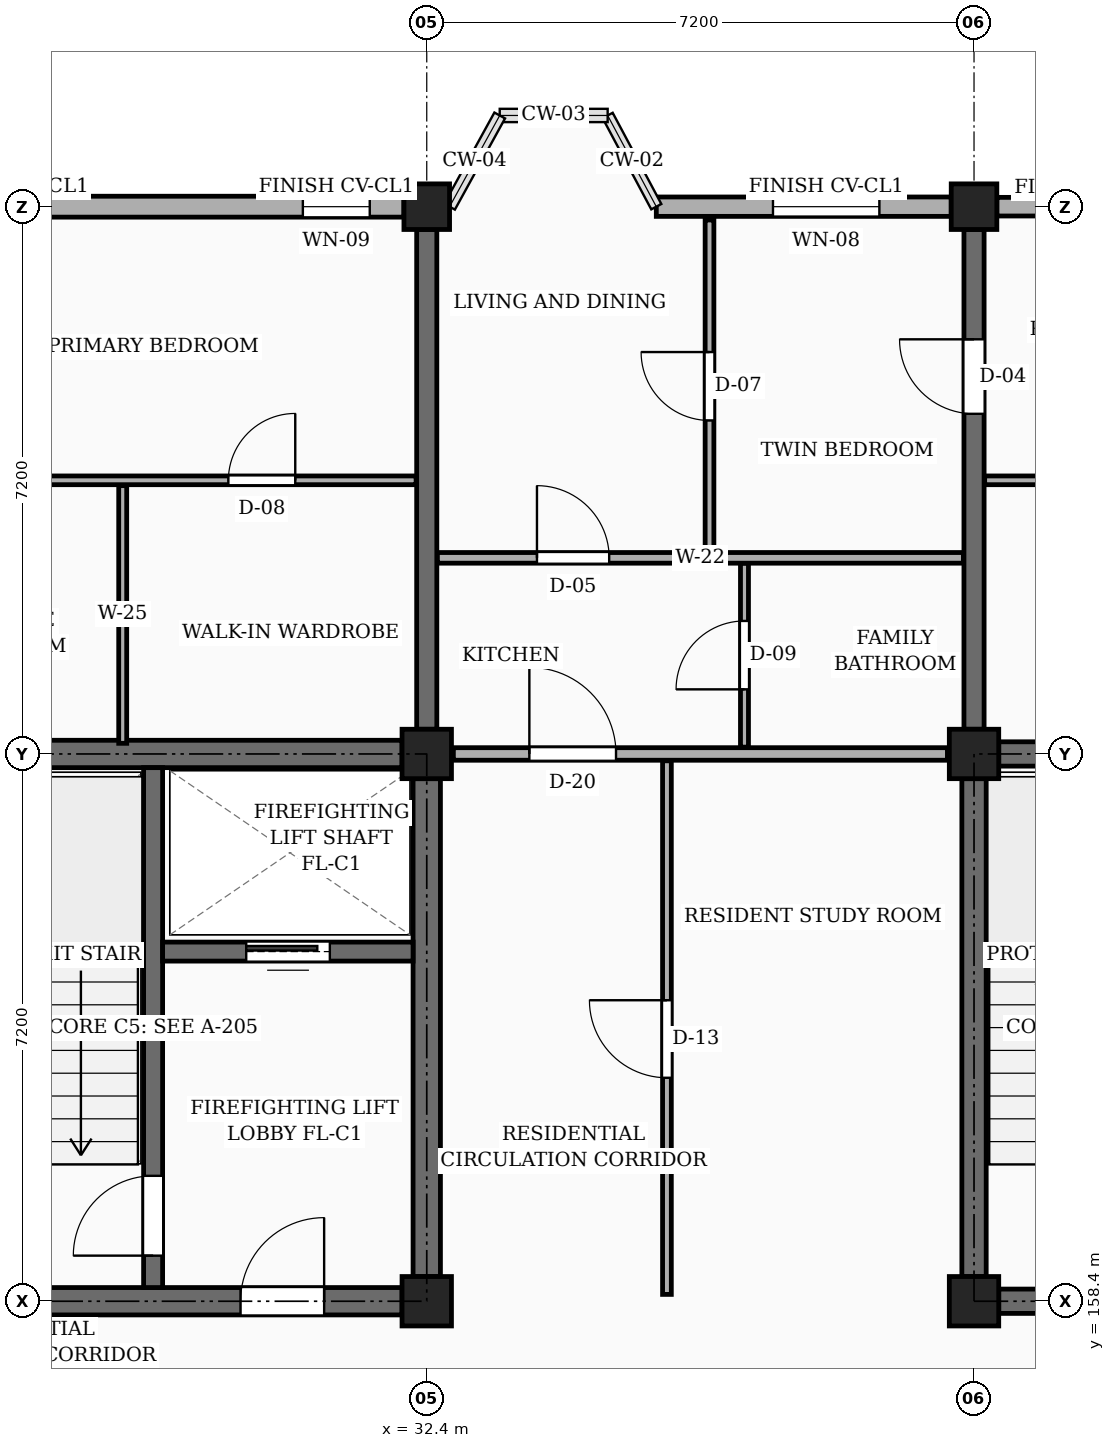
"""IFC4 building model, lengths in metres.
Left out: names, types, materials, properties, quantities, classifications, styles, units other than length and angle.
Written with IfcOpenShell. Run it as: python <this file> out.ifc"""

import sys

from ifc_helpers import new_model, si_unit, direction, frame, frame_2d, origin, origin_2d, place, context, subcontext, project, spatial, rectangle, extrude, element, fill, save


model = new_model("IFC4")
c1 = context("Model", 3, precision=1e-05, world=origin(), true_north=direction((0.0, 1.0)))
c2 = subcontext(c1, "Body", "Model", "MODEL_VIEW")
j1 = project(units=[si_unit("LENGTHUNIT", "METRE"), si_unit("PLANEANGLEUNIT", "RADIAN")], contexts=[c1])
p1 = place(None, origin())
s1 = spatial("IfcSite", under=j1, at=p1, CompositionType="ELEMENT")
p2 = place(p1, origin())
s2 = spatial("IfcBuilding", under=s1, at=p2, CompositionType="ELEMENT")
p3 = place(p2, frame((0.0, 0.0, 7.65)))
s3 = spatial("IfcBuildingStorey", under=s2, at=p3, CompositionType="ELEMENT", Elevation=7.65)
for number, where, z_axis, x_axis in (
    (1, (32.4, 158.4, 0.0), (0.0, 0.0, 1.0), (1.0, 0.0, 0.0)),
    (2, (32.4, 165.6, 0.0), (0.0, 0.0, 1.0), (1.0, 0.0, 0.0)),
):
    element("IfcColumn", number, at=place(p3, frame(where, z_axis=z_axis, x_axis=x_axis)), inside=s3, PredefinedType="COLUMN", context=c2, shape_type="SweptSolid", body=[
        extrude(rectangle(XDim=0.65, YDim=0.65, at=origin_2d()), origin(), (0.0, 0.0, 1.0), 3.15),
    ])
p4 = place(p3, frame((32.4, 172.8, 0.0), z_axis=(0.0, 0.0, 1.0), x_axis=(1.0, 0.0, 0.0)))
e3 = element("IfcColumn", 3, at=p4, inside=s3, PredefinedType="COLUMN", context=c2, shape_type="SweptSolid", body=[
    extrude(rectangle(XDim=0.6, YDim=0.6, at=origin_2d()), origin(), (0.0, 0.0, 1.0), 3.15),
])
for number, where, z_axis, x_axis in (
    (4, (39.6, 158.4, 0.0), (0.0, 0.0, 1.0), (1.0, 0.0, 0.0)),
    (5, (39.6, 165.6, 0.0), (0.0, 0.0, 1.0), (1.0, 0.0, 0.0)),
):
    element("IfcColumn", number, at=place(p3, frame(where, z_axis=z_axis, x_axis=x_axis)), inside=s3, PredefinedType="COLUMN", context=c2, shape_type="SweptSolid", body=[
        extrude(rectangle(XDim=0.65, YDim=0.65, at=origin_2d()), origin(), (0.0, 0.0, 1.0), 3.15),
    ])
p5 = place(p3, frame((39.6, 172.8, 0.0), z_axis=(0.0, 0.0, 1.0), x_axis=(1.0, 0.0, 0.0)))
e6 = element("IfcColumn", 6, at=p5, inside=s3, PredefinedType="COLUMN", context=c2, shape_type="SweptSolid", body=[
    extrude(rectangle(XDim=0.6, YDim=0.6, at=origin_2d()), origin(), (0.0, 0.0, 1.0), 3.15),
])
p6 = place(p3, frame((32.4, 165.925, 0.0), z_axis=(0.0, 0.0, 1.0), x_axis=(0.0, 1.0, 0.0)))
e7 = element("IfcWall", 7, at=p6, inside=s3, PredefinedType="SOLIDWALL", context=c2, shape_type="SweptSolid", body=[
    extrude(rectangle(XDim=6.575, YDim=0.265, at=frame_2d((3.288, 0.0))), origin(), (0.0, 0.0, 1.0), 2.185),
])
p7 = place(p3, frame((39.6, 165.925, 0.0), z_axis=(0.0, 0.0, 1.0), x_axis=(0.0, 1.0, 0.0)))
e8 = element("IfcWall", 8, at=p7, inside=s3, PredefinedType="SOLIDWALL", context=c2, shape_type="SweptSolid", body=[
    extrude(rectangle(XDim=6.575, YDim=0.265, at=frame_2d((3.288, 0.0))), origin(), (0.0, 0.0, 1.0), 2.185),
])
p8 = place(p7, frame((4.15, 0.0, 0.0)))
e9 = element("IfcOpeningElement", 9, at=p8, cuts=e8, PredefinedType="OPENING", context=c2, shape_type="SweptSolid", body=[
    extrude(rectangle(XDim=0.98, YDim=2.12, at=frame_2d((0.49, 1.06))), frame((0.0, 0.143, 0.0), z_axis=(0.0, -1.0, 0.0), x_axis=(1.0, 0.0, 0.0)), (0.0, 0.0, 1.0), 0.285),
])
p9 = place(p3, frame((46.5, 172.8, 0.0), z_axis=(0.0, 0.0, 1.0), x_axis=(-1.0, 0.0, 0.0)))
e10 = element("IfcWall", 10, at=p9, inside=s3, PredefinedType="SOLIDWALL", context=c2, shape_type="SweptSolid", body=[
    extrude(rectangle(XDim=6.6, YDim=0.245, at=frame_2d((3.3, 0.0))), origin(), (0.0, 0.0, 1.0), 2.455),
])
p10 = place(p9, frame((0.45, 0.0, 0.78)))
e11 = element("IfcOpeningElement", 11, at=p10, cuts=e10, PredefinedType="OPENING", context=c2, shape_type="SweptSolid", body=[
    extrude(rectangle(XDim=1.24, YDim=1.15, at=frame_2d((0.62, 0.575))), frame((0.0, 0.133, 0.0), z_axis=(0.0, -1.0, 0.0), x_axis=(1.0, 0.0, 0.0)), (0.0, 0.0, 1.0), 0.265),
])
p11 = place(p9, frame((4.65, 0.0, 0.78)))
e12 = element("IfcOpeningElement", 12, at=p11, cuts=e10, PredefinedType="OPENING", context=c2, shape_type="SweptSolid", body=[
    extrude(rectangle(XDim=1.4, YDim=1.15, at=frame_2d((0.7, 0.575))), frame((0.0, 0.133, 0.0), z_axis=(0.0, -1.0, 0.0), x_axis=(1.0, 0.0, 0.0)), (0.0, 0.0, 1.0), 0.265),
])
p12 = place(p3, frame((39.3, 172.8, 0.0), z_axis=(0.0, 0.0, 1.0), x_axis=(-1.0, 0.0, 0.0)))
e13 = element("IfcWall", 13, at=p12, inside=s3, PredefinedType="SOLIDWALL", context=c2, shape_type="SweptSolid", body=[
    extrude(rectangle(XDim=3.88, YDim=0.255, at=frame_2d((1.94, 0.0))), origin(), (0.0, 0.0, 1.0), 2.455),
])
p13 = place(p12, frame((0.945, 0.0, 0.78)))
e14 = element("IfcOpeningElement", 14, at=p13, cuts=e13, PredefinedType="OPENING", context=c2, shape_type="SweptSolid", body=[
    extrude(rectangle(XDim=1.4, YDim=1.15, at=frame_2d((0.7, 0.575))), frame((0.0, 0.137, 0.0), z_axis=(0.0, -1.0, 0.0), x_axis=(1.0, 0.0, 0.0)), (0.0, 0.0, 1.0), 0.275),
])
p14 = place(p3, frame((32.1, 172.8, 0.0), z_axis=(0.0, 0.0, 1.0), x_axis=(-1.0, 0.0, 0.0)))
e15 = element("IfcWall", 15, at=p14, inside=s3, PredefinedType="SOLIDWALL", context=c2, shape_type="SweptSolid", body=[
    extrude(rectangle(XDim=6.6, YDim=0.275, at=frame_2d((3.3, 0.0))), origin(), (0.0, 0.0, 1.0), 2.455),
])
p15 = place(p14, frame((0.45, 0.0, 0.78)))
e16 = element("IfcOpeningElement", 16, at=p15, cuts=e15, PredefinedType="OPENING", context=c2, shape_type="SweptSolid", body=[
    extrude(rectangle(XDim=0.88, YDim=1.26, at=frame_2d((0.44, 0.63))), frame((0.0, 0.147, 0.0), z_axis=(0.0, -1.0, 0.0), x_axis=(1.0, 0.0, 0.0)), (0.0, 0.0, 1.0), 0.295),
])
p16 = place(p14, frame((4.65, 0.0, 0.78)))
e17 = element("IfcOpeningElement", 17, at=p16, cuts=e15, PredefinedType="OPENING", context=c2, shape_type="SweptSolid", body=[
    extrude(rectangle(XDim=1.04, YDim=1.26, at=frame_2d((0.52, 0.63))), frame((0.0, 0.147, 0.0), z_axis=(0.0, -1.0, 0.0), x_axis=(1.0, 0.0, 0.0)), (0.0, 0.0, 1.0), 0.295),
])
p17 = place(p3, frame((25.525, 165.6, 0.0), z_axis=(0.0, 0.0, 1.0), x_axis=(1.0, 0.0, 0.0)))
e18 = element("IfcWall", 18, at=p17, inside=s3, PredefinedType="SHEAR", context=c2, shape_type="SweptSolid", body=[
    extrude(rectangle(XDim=6.55, YDim=0.36, at=frame_2d((3.275, 0.0))), origin(), (0.0, 0.0, 1.0), 2.885),
])
p18 = place(p3, frame((32.4, 158.725, 0.0), z_axis=(0.0, 0.0, 1.0), x_axis=(0.0, 1.0, 0.0)))
e19 = element("IfcWall", 19, at=p18, inside=s3, PredefinedType="SHEAR", context=c2, shape_type="SweptSolid", body=[
    extrude(rectangle(XDim=6.55, YDim=0.36, at=frame_2d((3.275, 0.0))), origin(), (0.0, 0.0, 1.0), 2.885),
])
p19 = place(p3, frame((25.525, 158.4, 0.0), z_axis=(0.0, 0.0, 1.0), x_axis=(1.0, 0.0, 0.0)))
e20 = element("IfcWall", 20, at=p19, inside=s3, PredefinedType="SHEAR", context=c2, shape_type="SweptSolid", body=[
    extrude(rectangle(XDim=6.55, YDim=0.36, at=frame_2d((3.275, 0.0))), origin(), (0.0, 0.0, 1.0), 2.885),
])
p20 = place(p19, frame((4.425, 0.0, 0.0)))
e21 = element("IfcOpeningElement", 21, at=p20, cuts=e20, PredefinedType="OPENING", context=c2, shape_type="SweptSolid", body=[
    extrude(rectangle(XDim=1.1, YDim=2.15, at=frame_2d((0.55, 1.075))), frame((0.0, 0.19, 0.0), z_axis=(0.0, -1.0, 0.0), x_axis=(1.0, 0.0, 0.0)), (0.0, 0.0, 1.0), 0.38),
])
p21 = place(p3, frame((28.8, 158.58, 0.0), z_axis=(0.0, 0.0, 1.0), x_axis=(0.0, 1.0, 0.0)))
e22 = element("IfcWall", 22, at=p21, inside=s3, PredefinedType="SHEAR", context=c2, shape_type="SweptSolid", body=[
    extrude(rectangle(XDim=6.84, YDim=0.25, at=frame_2d((3.42, 0.0))), origin(), (0.0, 0.0, 1.0), 2.885),
])
p22 = place(p21, frame((0.42, 0.0, 0.0)))
e23 = element("IfcOpeningElement", 23, at=p22, cuts=e22, PredefinedType="OPENING", context=c2, shape_type="SweptSolid", body=[
    extrude(rectangle(XDim=1.05, YDim=2.15, at=frame_2d((0.525, 1.075))), frame((0.0, 0.135, 0.0), z_axis=(0.0, -1.0, 0.0), x_axis=(1.0, 0.0, 0.0)), (0.0, 0.0, 1.0), 0.27),
])
p23 = place(p3, frame((28.925, 163.0, 0.0), z_axis=(0.0, 0.0, 1.0), x_axis=(1.0, 0.0, 0.0)))
e24 = element("IfcWall", 24, at=p23, inside=s3, PredefinedType="SHEAR", context=c2, shape_type="SweptSolid", body=[
    extrude(rectangle(XDim=3.295, YDim=0.25, at=frame_2d((1.647, 0.0))), origin(), (0.0, 0.0, 1.0), 2.885),
])
p24 = place(p23, frame((1.1, 0.0, 0.0)))
e25 = element("IfcOpeningElement", 25, at=p24, cuts=e24, PredefinedType="OPENING", context=c2, shape_type="SweptSolid", body=[
    extrude(rectangle(XDim=1.1, YDim=2.2, at=frame_2d((0.55, 1.1))), frame((0.0, 0.135, 0.0), z_axis=(0.0, -1.0, 0.0), x_axis=(1.0, 0.0, 0.0)), (0.0, 0.0, 1.0), 0.27),
])
p25 = place(p3, frame((39.6, 158.725, 0.0), z_axis=(0.0, 0.0, 1.0), x_axis=(0.0, 1.0, 0.0)))
e26 = element("IfcWall", 26, at=p25, inside=s3, PredefinedType="SHEAR", context=c2, shape_type="SweptSolid", body=[
    extrude(rectangle(XDim=6.55, YDim=0.32, at=frame_2d((3.275, 0.0))), origin(), (0.0, 0.0, 1.0), 2.885),
])
p26 = place(p3, frame((39.925, 165.6, 0.0), z_axis=(0.0, 0.0, 1.0), x_axis=(1.0, 0.0, 0.0)))
e27 = element("IfcWall", 27, at=p26, inside=s3, PredefinedType="SHEAR", context=c2, shape_type="SweptSolid", body=[
    extrude(rectangle(XDim=6.55, YDim=0.32, at=frame_2d((3.275, 0.0))), origin(), (0.0, 0.0, 1.0), 2.885),
])
p27 = place(p3, frame((39.925, 158.4, 0.0), z_axis=(0.0, 0.0, 1.0), x_axis=(1.0, 0.0, 0.0)))
e28 = element("IfcWall", 28, at=p27, inside=s3, PredefinedType="SHEAR", context=c2, shape_type="SweptSolid", body=[
    extrude(rectangle(XDim=6.55, YDim=0.32, at=frame_2d((3.275, 0.0))), origin(), (0.0, 0.0, 1.0), 2.885),
])
p28 = place(p27, frame((4.425, 0.0, 0.0)))
e29 = element("IfcOpeningElement", 29, at=p28, cuts=e28, PredefinedType="OPENING", context=c2, shape_type="SweptSolid", body=[
    extrude(rectangle(XDim=1.1, YDim=2.15, at=frame_2d((0.55, 1.075))), frame((0.0, 0.17, 0.0), z_axis=(0.0, -1.0, 0.0), x_axis=(1.0, 0.0, 0.0)), (0.0, 0.0, 1.0), 0.34),
])
p29 = place(p3, frame((32.75, 165.6, 0.0), z_axis=(0.0, 0.0, 1.0), x_axis=(1.0, 0.0, 0.0)))
e30 = element("IfcWall", 30, at=p29, inside=s3, PredefinedType="PARTITIONING", context=c2, shape_type="SweptSolid", body=[
    extrude(rectangle(XDim=6.5, YDim=0.165, at=frame_2d((3.25, 0.0))), origin(), (0.0, 0.0, 1.0), 2.185),
])
p30 = place(p29, frame((1.0, 0.0, 0.0)))
e31 = element("IfcOpeningElement", 31, at=p30, cuts=e30, PredefinedType="OPENING", context=c2, shape_type="SweptSolid", body=[
    extrude(rectangle(XDim=1.14, YDim=2.18, at=frame_2d((0.57, 1.09))), frame((0.0, 0.093, 0.0), z_axis=(0.0, -1.0, 0.0), x_axis=(1.0, 0.0, 0.0)), (0.0, 0.0, 1.0), 0.185),
])
p31 = place(p3, frame((25.34, 169.2, 0.0), z_axis=(0.0, 0.0, 1.0), x_axis=(1.0, 0.0, 0.0)))
e32 = element("IfcWall", 32, at=p31, inside=s3, PredefinedType="PARTITIONING", context=c2, shape_type="SweptSolid", body=[
    extrude(rectangle(XDim=6.92, YDim=0.115, at=frame_2d((3.46, 0.0))), origin(), (0.0, 0.0, 1.0), 2.32),
])
p32 = place(p31, frame((1.05, 0.0, 0.0)))
e33 = element("IfcOpeningElement", 33, at=p32, cuts=e32, PredefinedType="OPENING", context=c2, shape_type="SweptSolid", body=[
    extrude(rectangle(XDim=0.87, YDim=2.05, at=frame_2d((0.435, 1.025))), frame((0.0, 0.067, 0.0), z_axis=(0.0, -1.0, 0.0), x_axis=(1.0, 0.0, 0.0)), (0.0, 0.0, 1.0), 0.135),
])
p33 = place(p31, frame((4.45, 0.0, 0.0)))
e34 = element("IfcOpeningElement", 34, at=p33, cuts=e32, PredefinedType="OPENING", context=c2, shape_type="SweptSolid", body=[
    extrude(rectangle(XDim=0.88, YDim=2.08, at=frame_2d((0.44, 1.04))), frame((0.0, 0.067, 0.0), z_axis=(0.0, -1.0, 0.0), x_axis=(1.0, 0.0, 0.0)), (0.0, 0.0, 1.0), 0.135),
])
p34 = place(p3, frame((28.4, 165.74, 0.0), z_axis=(0.0, 0.0, 1.0), x_axis=(0.0, 1.0, 0.0)))
e35 = element("IfcWall", 35, at=p34, inside=s3, PredefinedType="PARTITIONING", context=c2, shape_type="SweptSolid", body=[
    extrude(rectangle(XDim=3.39, YDim=0.105, at=frame_2d((1.695, 0.0))), origin(), (0.0, 0.0, 1.0), 2.32),
])
p35 = place(p3, frame((35.56, 158.49, 0.0), z_axis=(0.0, 0.0, 1.0), x_axis=(0.0, 1.0, 0.0)))
e36 = element("IfcWall", 36, at=p35, inside=s3, PredefinedType="PARTITIONING", context=c2, shape_type="SweptSolid", body=[
    extrude(rectangle(XDim=7.02, YDim=0.115, at=frame_2d((3.51, 0.0))), origin(), (0.0, 0.0, 1.0), 2.32),
])
p36 = place(p35, frame((2.85, 0.0, 0.0)))
e37 = element("IfcOpeningElement", 37, at=p36, cuts=e36, PredefinedType="OPENING", context=c2, shape_type="SweptSolid", body=[
    extrude(rectangle(XDim=1.02, YDim=2.15, at=frame_2d((0.51, 1.075))), frame((0.0, 0.067, 0.0), z_axis=(0.0, -1.0, 0.0), x_axis=(1.0, 0.0, 0.0)), (0.0, 0.0, 1.0), 0.135),
])
p37 = place(p3, frame((36.12, 168.25, 0.0), z_axis=(0.0, 0.0, 1.0), x_axis=(0.0, 1.0, 0.0)))
e38 = element("IfcWall", 38, at=p37, inside=s3, PredefinedType="PARTITIONING", context=c2, shape_type="SweptSolid", body=[
    extrude(rectangle(XDim=4.375, YDim=0.115, at=frame_2d((2.188, 0.0))), origin(), (0.0, 0.0, 1.0), 2.32),
])
p38 = place(p37, frame((1.738, 0.0, 0.0)))
e39 = element("IfcOpeningElement", 39, at=p38, cuts=e38, PredefinedType="OPENING", context=c2, shape_type="SweptSolid", body=[
    extrude(rectangle(XDim=0.9, YDim=2.1, at=frame_2d((0.45, 1.05))), frame((0.0, 0.067, 0.0), z_axis=(0.0, -1.0, 0.0), x_axis=(1.0, 0.0, 0.0)), (0.0, 0.0, 1.0), 0.135),
])
p39 = place(p3, frame((36.58, 165.69, 0.0), z_axis=(0.0, 0.0, 1.0), x_axis=(0.0, 1.0, 0.0)))
e40 = element("IfcWall", 40, at=p39, inside=s3, PredefinedType="PARTITIONING", context=c2, shape_type="SweptSolid", body=[
    extrude(rectangle(XDim=2.42, YDim=0.105, at=frame_2d((1.21, 0.0))), origin(), (0.0, 0.0, 1.0), 2.32),
])
p40 = place(p39, frame((0.76, 0.0, 0.0)))
e41 = element("IfcOpeningElement", 41, at=p40, cuts=e40, PredefinedType="OPENING", context=c2, shape_type="SweptSolid", body=[
    extrude(rectangle(XDim=0.9, YDim=2.05, at=frame_2d((0.45, 1.025))), frame((0.0, 0.062, 0.0), z_axis=(0.0, -1.0, 0.0), x_axis=(1.0, 0.0, 0.0)), (0.0, 0.0, 1.0), 0.125),
])
p41 = place(p3, frame((32.54, 168.18, 0.0), z_axis=(0.0, 0.0, 1.0), x_axis=(1.0, 0.0, 0.0)))
e42 = element("IfcWall", 42, at=p41, inside=s3, PredefinedType="PARTITIONING", context=c2, shape_type="SweptSolid", body=[
    extrude(rectangle(XDim=6.92, YDim=0.14, at=frame_2d((3.46, 0.0))), origin(), (0.0, 0.0, 1.0), 2.32),
])
p42 = place(p41, frame((1.31, 0.0, 0.0)))
e43 = element("IfcOpeningElement", 43, at=p42, cuts=e42, PredefinedType="OPENING", context=c2, shape_type="SweptSolid", body=[
    extrude(rectangle(XDim=0.95, YDim=2.1, at=frame_2d((0.475, 1.05))), frame((0.0, 0.08, 0.0), z_axis=(0.0, -1.0, 0.0), x_axis=(1.0, 0.0, 0.0)), (0.0, 0.0, 1.0), 0.16),
])
p43 = place(p3, frame((39.74, 169.2, 0.0), z_axis=(0.0, 0.0, 1.0), x_axis=(1.0, 0.0, 0.0)))
e44 = element("IfcWall", 44, at=p43, inside=s3, PredefinedType="PARTITIONING", context=c2, shape_type="SweptSolid", body=[
    extrude(rectangle(XDim=6.92, YDim=0.115, at=frame_2d((3.46, 0.0))), origin(), (0.0, 0.0, 1.0), 2.32),
])
p44 = place(p43, frame((1.05, 0.0, 0.0)))
e45 = element("IfcOpeningElement", 45, at=p44, cuts=e44, PredefinedType="OPENING", context=c2, shape_type="SweptSolid", body=[
    extrude(rectangle(XDim=0.87, YDim=2.05, at=frame_2d((0.435, 1.025))), frame((0.0, 0.067, 0.0), z_axis=(0.0, -1.0, 0.0), x_axis=(1.0, 0.0, 0.0)), (0.0, 0.0, 1.0), 0.135),
])
p45 = place(p43, frame((4.45, 0.0, 0.0)))
e46 = element("IfcOpeningElement", 46, at=p45, cuts=e44, PredefinedType="OPENING", context=c2, shape_type="SweptSolid", body=[
    extrude(rectangle(XDim=0.88, YDim=2.08, at=frame_2d((0.44, 1.04))), frame((0.0, 0.067, 0.0), z_axis=(0.0, -1.0, 0.0), x_axis=(1.0, 0.0, 0.0)), (0.0, 0.0, 1.0), 0.135),
])
p46 = place(p13, origin())
e47 = element("IfcWindow", 47, at=p46, inside=s3, PartitioningType="SINGLE_PANEL", PredefinedType="WINDOW", context=c2, shape_type="SweptSolid", body=[
    extrude(rectangle(XDim=1.4, YDim=1.15, at=frame_2d((0.7, 0.575))), frame((0.0, 0.03, 0.0), z_axis=(0.0, -1.0, 0.0), x_axis=(1.0, 0.0, 0.0)), (0.0, 0.0, 1.0), 0.06),
])
fill(e14, e47)
p47 = place(p15, origin())
e48 = element("IfcWindow", 48, at=p47, inside=s3, PartitioningType="SINGLE_PANEL", PredefinedType="WINDOW", context=c2, shape_type="SweptSolid", body=[
    extrude(rectangle(XDim=0.88, YDim=1.26, at=frame_2d((0.44, 0.63))), frame((0.0, 0.03, 0.0), z_axis=(0.0, -1.0, 0.0), x_axis=(1.0, 0.0, 0.0)), (0.0, 0.0, 1.0), 0.06),
])
fill(e16, e48)
p48 = place(p20, frame((1.1, 0.0, 0.0), z_axis=(0.0, 0.0, 1.0), x_axis=(-1.0, 0.0, 0.0)))
e49 = element("IfcDoor", 49, at=p48, inside=s3, OperationType="SINGLE_SWING_RIGHT", PredefinedType="DOOR", context=c2, shape_type="SweptSolid", body=[
    extrude(rectangle(XDim=1.1, YDim=2.15, at=frame_2d((0.55, 1.075))), frame((0.0, 0.025, 0.0), z_axis=(0.0, -1.0, 0.0), x_axis=(1.0, 0.0, 0.0)), (0.0, 0.0, 1.0), 0.05),
])
fill(e21, e49)
p49 = place(p22, origin())
e50 = element("IfcDoor", 50, at=p49, inside=s3, OperationType="SINGLE_SWING_LEFT", PredefinedType="DOOR", context=c2, shape_type="SweptSolid", body=[
    extrude(rectangle(XDim=1.05, YDim=2.15, at=frame_2d((0.525, 1.075))), frame((0.0, 0.025, 0.0), z_axis=(0.0, -1.0, 0.0), x_axis=(1.0, 0.0, 0.0)), (0.0, 0.0, 1.0), 0.05),
])
fill(e23, e50)
p50 = place(p24, origin())
e51 = element("IfcDoor", 51, at=p50, inside=s3, OperationType="SLIDING_TO_LEFT", PredefinedType="DOOR", context=c2, shape_type="SweptSolid", body=[
    extrude(rectangle(XDim=1.1, YDim=2.2, at=frame_2d((0.55, 1.1))), frame((0.0, 0.025, 0.0), z_axis=(0.0, -1.0, 0.0), x_axis=(1.0, 0.0, 0.0)), (0.0, 0.0, 1.0), 0.05),
])
fill(e25, e51)
p51 = place(p30, origin())
e52 = element("IfcDoor", 52, at=p51, inside=s3, OperationType="SINGLE_SWING_LEFT", PredefinedType="DOOR", context=c2, shape_type="SweptSolid", body=[
    extrude(rectangle(XDim=1.14, YDim=2.18, at=frame_2d((0.57, 1.09))), frame((0.0, 0.025, 0.0), z_axis=(0.0, -1.0, 0.0), x_axis=(1.0, 0.0, 0.0)), (0.0, 0.0, 1.0), 0.05),
])
fill(e31, e52)
p52 = place(p33, origin())
e53 = element("IfcDoor", 53, at=p52, inside=s3, OperationType="SINGLE_SWING_RIGHT", PredefinedType="DOOR", context=c2, shape_type="SweptSolid", body=[
    extrude(rectangle(XDim=0.88, YDim=2.08, at=frame_2d((0.44, 1.04))), frame((0.0, 0.025, 0.0), z_axis=(0.0, -1.0, 0.0), x_axis=(1.0, 0.0, 0.0)), (0.0, 0.0, 1.0), 0.05),
])
fill(e34, e53)
p53 = place(p36, origin())
e54 = element("IfcDoor", 54, at=p53, inside=s3, OperationType="SINGLE_SWING_RIGHT", PredefinedType="DOOR", context=c2, shape_type="SweptSolid", body=[
    extrude(rectangle(XDim=1.02, YDim=2.15, at=frame_2d((0.51, 1.075))), frame((0.0, 0.025, 0.0), z_axis=(0.0, -1.0, 0.0), x_axis=(1.0, 0.0, 0.0)), (0.0, 0.0, 1.0), 0.05),
])
fill(e37, e54)
p54 = place(p38, origin())
e55 = element("IfcDoor", 55, at=p54, inside=s3, OperationType="SINGLE_SWING_RIGHT", PredefinedType="DOOR", context=c2, shape_type="SweptSolid", body=[
    extrude(rectangle(XDim=0.9, YDim=2.1, at=frame_2d((0.45, 1.05))), frame((0.0, 0.025, 0.0), z_axis=(0.0, -1.0, 0.0), x_axis=(1.0, 0.0, 0.0)), (0.0, 0.0, 1.0), 0.05),
])
fill(e39, e55)
p55 = place(p40, origin())
e56 = element("IfcDoor", 56, at=p55, inside=s3, OperationType="SINGLE_SWING_LEFT", PredefinedType="DOOR", context=c2, shape_type="SweptSolid", body=[
    extrude(rectangle(XDim=0.9, YDim=2.05, at=frame_2d((0.45, 1.025))), frame((0.0, 0.025, 0.0), z_axis=(0.0, -1.0, 0.0), x_axis=(1.0, 0.0, 0.0)), (0.0, 0.0, 1.0), 0.05),
])
fill(e41, e56)
p56 = place(p42, origin())
e57 = element("IfcDoor", 57, at=p56, inside=s3, OperationType="SINGLE_SWING_LEFT", PredefinedType="DOOR", context=c2, shape_type="SweptSolid", body=[
    extrude(rectangle(XDim=0.95, YDim=2.1, at=frame_2d((0.475, 1.05))), frame((0.0, 0.025, 0.0), z_axis=(0.0, -1.0, 0.0), x_axis=(1.0, 0.0, 0.0)), (0.0, 0.0, 1.0), 0.05),
])
fill(e43, e57)
p57 = place(p8, origin())
e58 = element("IfcDoor", 58, at=p57, inside=s3, OperationType="SINGLE_SWING_RIGHT", PredefinedType="DOOR", context=c2, shape_type="SweptSolid", body=[
    extrude(rectangle(XDim=0.98, YDim=2.12, at=frame_2d((0.49, 1.06))), frame((0.0, 0.025, 0.0), z_axis=(0.0, -1.0, 0.0), x_axis=(1.0, 0.0, 0.0)), (0.0, 0.0, 1.0), 0.05),
])
fill(e9, e58)
save(model, sys.argv[1])
